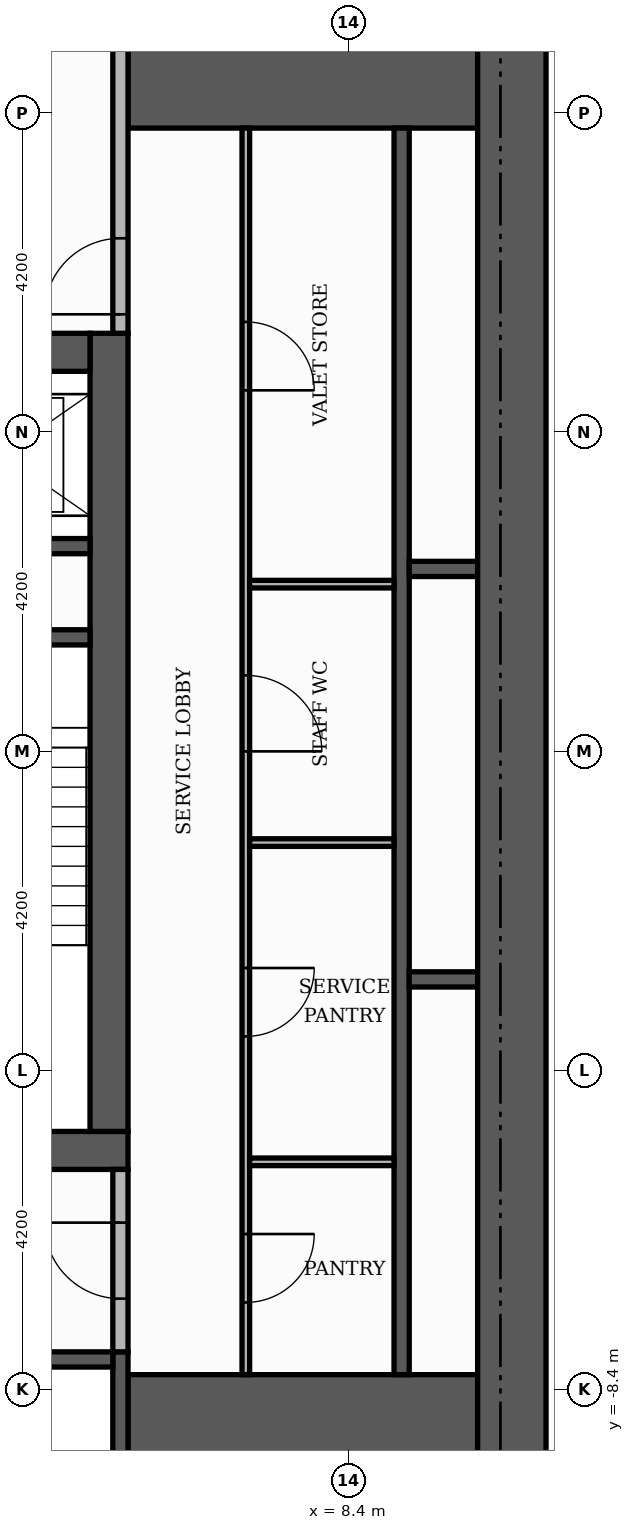
"""IFC4 building model, lengths in metres.
Left out: names, types, materials, properties, quantities, classifications, styles, units other than length and angle.
Written with IfcOpenShell. Run it as: python <this file> out.ifc"""

import sys

from ifc_helpers import new_model, si_unit, direction, frame, frame_2d, origin, place, context, subcontext, project, spatial, rectangle, extrude, element, fill, save


model = new_model("IFC4")
c1 = context("Model", 3, precision=1e-05, world=origin(), true_north=direction((0.0, 1.0)))
c2 = subcontext(c1, "Body", "Model", "MODEL_VIEW")
j1 = project(units=[si_unit("LENGTHUNIT", "METRE"), si_unit("PLANEANGLEUNIT", "RADIAN")], contexts=[c1])
p1 = place(None, origin())
s1 = spatial("IfcSite", under=j1, at=p1, CompositionType="ELEMENT")
p2 = place(p1, origin())
s2 = spatial("IfcBuilding", under=s1, at=p2, CompositionType="ELEMENT")
p3 = place(p2, frame((0.0, 0.0, 94.8)))
s3 = spatial("IfcBuildingStorey", under=s2, at=p3, CompositionType="ELEMENT", Elevation=94.8)
p4 = place(p3, frame((-5.5, -5.25, 0.0), z_axis=(0.0, 0.0, 1.0), x_axis=(1.0, 0.0, 0.0)))
e1 = element("IfcWall", 1, at=p4, inside=s3, PredefinedType="SHEAR", context=c2, shape_type="SweptSolid", body=[
    extrude(rectangle(XDim=11.0, YDim=0.5, at=frame_2d((5.5, 0.0))), origin(), (0.0, 0.0, 1.0), 3.48),
])
p5 = place(p4, frame((4.9, 0.0, 0.0)))
e2 = element("IfcOpeningElement", 2, at=p5, cuts=e1, PredefinedType="OPENING", context=c2, shape_type="SweptSolid", body=[
    extrude(rectangle(XDim=1.2, YDim=2.1, at=frame_2d((0.6, 1.05))), frame((0.0, 0.26, 0.0), z_axis=(0.0, -1.0, 0.0), x_axis=(1.0, 0.0, 0.0)), (0.0, 0.0, 1.0), 0.52),
])
p6 = place(p3, frame((5.25, -5.0, 0.0), z_axis=(0.0, 0.0, 1.0), x_axis=(0.0, 1.0, 0.0)))
e3 = element("IfcWall", 3, at=p6, inside=s3, PredefinedType="SHEAR", context=c2, shape_type="SweptSolid", body=[
    extrude(rectangle(XDim=10.5, YDim=0.5, at=frame_2d((5.25, 0.0))), origin(), (0.0, 0.0, 1.0), 3.48),
])
p7 = place(p3, frame((-5.0, 5.25, 0.0), z_axis=(0.0, 0.0, 1.0), x_axis=(1.0, 0.0, 0.0)))
e4 = element("IfcWall", 4, at=p7, inside=s3, PredefinedType="SHEAR", context=c2, shape_type="SweptSolid", body=[
    extrude(rectangle(XDim=10.0, YDim=0.5, at=frame_2d((5.0, 0.0))), origin(), (0.0, 0.0, 1.0), 3.48),
])
p8 = place(p7, frame((4.4, 0.0, 0.0)))
e5 = element("IfcOpeningElement", 5, at=p8, cuts=e4, PredefinedType="OPENING", context=c2, shape_type="SweptSolid", body=[
    extrude(rectangle(XDim=1.2, YDim=2.1, at=frame_2d((0.6, 1.05))), frame((0.0, 0.26, 0.0), z_axis=(0.0, -1.0, 0.0), x_axis=(1.0, 0.0, 0.0)), (0.0, 0.0, 1.0), 0.52),
])
for number, where, z_axis, x_axis in (
    (6, (5.5, -9.15, 0.0), (0.0, 0.0, 1.0), (1.0, 0.0, 0.0)),
    (7, (5.5, 9.15, 0.0), (0.0, 0.0, 1.0), (1.0, 0.0, 0.0)),
):
    element("IfcWall", number, at=place(p3, frame(where, z_axis=z_axis, x_axis=x_axis)), inside=s3, PredefinedType="SHEAR", context=c2, shape_type="SweptSolid", body=[
        extrude(rectangle(XDim=4.6, YDim=1.9, at=frame_2d((2.3, 0.0))), origin(), (0.0, 0.0, 1.0), 3.48),
    ])
p9 = place(p3, frame((2.15, 1.5, 0.0), z_axis=(0.0, 0.0, 1.0), x_axis=(1.0, 0.0, 0.0)))
e8 = element("IfcWall", 8, at=p9, inside=s3, PredefinedType="SHEAR", context=c2, shape_type="SweptSolid", body=[
    extrude(rectangle(XDim=2.85, YDim=0.2, at=frame_2d((1.425, 0.0))), origin(), (0.0, 0.0, 1.0), 3.48),
])
p10 = place(p3, frame((5.4, -10.1, 0.0), z_axis=(0.0, 0.0, 1.0), x_axis=(0.0, 1.0, 0.0)))
e9 = element("IfcWall", 9, at=p10, inside=s3, PredefinedType="SHEAR", context=c2, shape_type="SweptSolid", body=[
    extrude(rectangle(XDim=2.2, YDim=0.2, at=frame_2d((1.1, 0.0))), origin(), (0.0, 0.0, 1.0), 3.48),
])
p11 = place(p3, frame((9.1, -8.2, 0.0), z_axis=(0.0, 0.0, 1.0), x_axis=(0.0, 1.0, 0.0)))
e10 = element("IfcWall", 10, at=p11, inside=s3, PredefinedType="SHEAR", context=c2, shape_type="SweptSolid", body=[
    extrude(rectangle(XDim=16.4, YDim=0.2, at=frame_2d((8.2, 0.0))), origin(), (0.0, 0.0, 1.0), 3.48),
])
p12 = place(p3, frame((2.8, -8.0, 0.0), z_axis=(0.0, 0.0, 1.0), x_axis=(1.0, 0.0, 0.0)))
e11 = element("IfcWall", 11, at=p12, inside=s3, PredefinedType="SHEAR", context=c2, shape_type="SweptSolid", body=[
    extrude(rectangle(XDim=2.5, YDim=0.2, at=frame_2d((1.25, 0.0))), origin(), (0.0, 0.0, 1.0), 3.48),
])
for number, where, z_axis, x_axis in (
    (12, (9.2, -3.0, 0.0), (0.0, 0.0, 1.0), (1.0, 0.0, 0.0)),
    (13, (9.2, 2.4, 0.0), (0.0, 0.0, 1.0), (1.0, 0.0, 0.0)),
):
    element("IfcWall", number, at=place(p3, frame(where, z_axis=z_axis, x_axis=x_axis)), inside=s3, PredefinedType="SHEAR", context=c2, shape_type="SweptSolid", body=[
        extrude(rectangle(XDim=0.9, YDim=0.2, at=frame_2d((0.45, 0.0))), origin(), (0.0, 0.0, 1.0), 3.48),
    ])
p13 = place(p3, frame((2.15, 2.7, 0.0), z_axis=(0.0, 0.0, 1.0), x_axis=(1.0, 0.0, 0.0)))
e14 = element("IfcWall", 14, at=p13, inside=s3, PredefinedType="SHEAR", context=c2, shape_type="SweptSolid", body=[
    extrude(rectangle(XDim=2.85, YDim=0.2, at=frame_2d((1.425, 0.0))), origin(), (0.0, 0.0, 1.0), 3.48),
])
p14 = place(p3, frame((10.55, -10.1, 0.0), z_axis=(0.0, 0.0, 1.0), x_axis=(0.0, 1.0, 0.0)))
e15 = element("IfcWall", 15, at=p14, inside=s3, PredefinedType="SHEAR", context=c2, shape_type="SweptSolid", body=[
    extrude(rectangle(XDim=20.2, YDim=0.9, at=frame_2d((10.1, 0.0))), origin(), (0.0, 0.0, 1.0), 3.48),
])
p15 = place(p3, frame((7.05, -8.2, 0.0), z_axis=(0.0, 0.0, 1.0), x_axis=(0.0, 1.0, 0.0)))
e16 = element("IfcWall", 16, at=p15, inside=s3, PredefinedType="PARTITIONING", context=c2, shape_type="SweptSolid", body=[
    extrude(rectangle(XDim=16.4, YDim=0.1, at=frame_2d((8.2, 0.0))), origin(), (0.0, 0.0, 1.0), 3.48),
])
p16 = place(p15, frame((0.95, 0.0, 0.0)))
e17 = element("IfcOpeningElement", 17, at=p16, cuts=e16, PredefinedType="OPENING", context=c2, shape_type="SweptSolid", body=[
    extrude(rectangle(XDim=0.9, YDim=2.1, at=frame_2d((0.45, 1.05))), frame((0.0, 0.06, 0.0), z_axis=(0.0, -1.0, 0.0), x_axis=(1.0, 0.0, 0.0)), (0.0, 0.0, 1.0), 0.12),
])
p17 = place(p15, frame((4.45, 0.0, 0.0)))
e18 = element("IfcOpeningElement", 18, at=p17, cuts=e16, PredefinedType="OPENING", context=c2, shape_type="SweptSolid", body=[
    extrude(rectangle(XDim=0.9, YDim=2.1, at=frame_2d((0.45, 1.05))), frame((0.0, 0.06, 0.0), z_axis=(0.0, -1.0, 0.0), x_axis=(1.0, 0.0, 0.0)), (0.0, 0.0, 1.0), 0.12),
])
p18 = place(p15, frame((8.2, 0.0, 0.0)))
e19 = element("IfcOpeningElement", 19, at=p18, cuts=e16, PredefinedType="OPENING", context=c2, shape_type="SweptSolid", body=[
    extrude(rectangle(XDim=1.0, YDim=2.1, at=frame_2d((0.5, 1.05))), frame((0.0, 0.06, 0.0), z_axis=(0.0, -1.0, 0.0), x_axis=(1.0, 0.0, 0.0)), (0.0, 0.0, 1.0), 0.12),
])
p19 = place(p15, frame((12.95, 0.0, 0.0)))
e20 = element("IfcOpeningElement", 20, at=p19, cuts=e16, PredefinedType="OPENING", context=c2, shape_type="SweptSolid", body=[
    extrude(rectangle(XDim=0.9, YDim=2.1, at=frame_2d((0.45, 1.05))), frame((0.0, 0.06, 0.0), z_axis=(0.0, -1.0, 0.0), x_axis=(1.0, 0.0, 0.0)), (0.0, 0.0, 1.0), 0.12),
])
p20 = place(p3, frame((5.4, -7.9, 0.0), z_axis=(0.0, 0.0, 1.0), x_axis=(0.0, 1.0, 0.0)))
e21 = element("IfcWall", 21, at=p20, inside=s3, PredefinedType="PARTITIONING", context=c2, shape_type="SweptSolid", body=[
    extrude(rectangle(XDim=2.4, YDim=0.2, at=frame_2d((1.2, 0.0))), origin(), (0.0, 0.0, 1.0), 3.48),
])
p21 = place(p20, frame((0.7, 0.0, 0.0)))
e22 = element("IfcOpeningElement", 22, at=p21, cuts=e21, PredefinedType="OPENING", context=c2, shape_type="SweptSolid", body=[
    extrude(rectangle(XDim=1.0, YDim=2.1, at=frame_2d((0.5, 1.05))), frame((0.0, 0.11, 0.0), z_axis=(0.0, -1.0, 0.0), x_axis=(1.0, 0.0, 0.0)), (0.0, 0.0, 1.0), 0.22),
])
for number, where, z_axis, x_axis in (
    (23, (7.1, -5.4, 0.0), (0.0, 0.0, 1.0), (1.0, 0.0, 0.0)),
    (24, (7.1, -1.2, 0.0), (0.0, 0.0, 1.0), (1.0, 0.0, 0.0)),
    (25, (7.1, 2.2, 0.0), (0.0, 0.0, 1.0), (1.0, 0.0, 0.0)),
):
    element("IfcWall", number, at=place(p3, frame(where, z_axis=z_axis, x_axis=x_axis)), inside=s3, PredefinedType="PARTITIONING", context=c2, shape_type="SweptSolid", body=[
        extrude(rectangle(XDim=1.9, YDim=0.1, at=frame_2d((0.95, 0.0))), origin(), (0.0, 0.0, 1.0), 3.48),
    ])
p22 = place(p3, frame((5.4, 5.5, 0.0), z_axis=(0.0, 0.0, 1.0), x_axis=(0.0, 1.0, 0.0)))
e26 = element("IfcWall", 26, at=p22, inside=s3, PredefinedType="PARTITIONING", context=c2, shape_type="SweptSolid", body=[
    extrude(rectangle(XDim=4.6, YDim=0.2, at=frame_2d((2.3, 0.0))), origin(), (0.0, 0.0, 1.0), 3.48),
])
p23 = place(p22, frame((0.25, 0.0, 0.0)))
e27 = element("IfcOpeningElement", 27, at=p23, cuts=e26, PredefinedType="OPENING", context=c2, shape_type="SweptSolid", body=[
    extrude(rectangle(XDim=1.0, YDim=2.1, at=frame_2d((0.5, 1.05))), frame((0.0, 0.11, 0.0), z_axis=(0.0, -1.0, 0.0), x_axis=(1.0, 0.0, 0.0)), (0.0, 0.0, 1.0), 0.22),
])
p24 = place(p23, origin())
e28 = element("IfcDoor", 28, at=p24, inside=s3, OperationType="SINGLE_SWING_LEFT", PredefinedType="DOOR", context=c2, shape_type="SweptSolid", body=[
    extrude(rectangle(XDim=1.0, YDim=2.1, at=frame_2d((0.5, 1.05))), frame((0.0, 0.025, 0.0), z_axis=(0.0, -1.0, 0.0), x_axis=(1.0, 0.0, 0.0)), (0.0, 0.0, 1.0), 0.05),
])
fill(e27, e28)
p25 = place(p21, origin())
e29 = element("IfcDoor", 29, at=p25, inside=s3, OperationType="SINGLE_SWING_RIGHT", PredefinedType="DOOR", context=c2, shape_type="SweptSolid", body=[
    extrude(rectangle(XDim=1.0, YDim=2.1, at=frame_2d((0.5, 1.05))), frame((0.0, 0.025, 0.0), z_axis=(0.0, -1.0, 0.0), x_axis=(1.0, 0.0, 0.0)), (0.0, 0.0, 1.0), 0.05),
])
fill(e22, e29)
p26 = place(p16, frame((0.9, 0.0, 0.0), z_axis=(0.0, 0.0, 1.0), x_axis=(-1.0, 0.0, 0.0)))
e30 = element("IfcDoor", 30, at=p26, inside=s3, OperationType="SINGLE_SWING_RIGHT", PredefinedType="DOOR", context=c2, shape_type="SweptSolid", body=[
    extrude(rectangle(XDim=0.9, YDim=2.1, at=frame_2d((0.45, 1.05))), frame((0.0, 0.025, 0.0), z_axis=(0.0, -1.0, 0.0), x_axis=(1.0, 0.0, 0.0)), (0.0, 0.0, 1.0), 0.05),
])
fill(e17, e30)
p27 = place(p17, frame((0.9, 0.0, 0.0), z_axis=(0.0, 0.0, 1.0), x_axis=(-1.0, 0.0, 0.0)))
e31 = element("IfcDoor", 31, at=p27, inside=s3, OperationType="SINGLE_SWING_RIGHT", PredefinedType="DOOR", context=c2, shape_type="SweptSolid", body=[
    extrude(rectangle(XDim=0.9, YDim=2.1, at=frame_2d((0.45, 1.05))), frame((0.0, 0.025, 0.0), z_axis=(0.0, -1.0, 0.0), x_axis=(1.0, 0.0, 0.0)), (0.0, 0.0, 1.0), 0.05),
])
fill(e18, e31)
p28 = place(p18, frame((1.0, 0.0, 0.0), z_axis=(0.0, 0.0, 1.0), x_axis=(-1.0, 0.0, 0.0)))
e32 = element("IfcDoor", 32, at=p28, inside=s3, OperationType="SINGLE_SWING_LEFT", PredefinedType="DOOR", context=c2, shape_type="SweptSolid", body=[
    extrude(rectangle(XDim=1.0, YDim=2.1, at=frame_2d((0.5, 1.05))), frame((0.0, 0.025, 0.0), z_axis=(0.0, -1.0, 0.0), x_axis=(1.0, 0.0, 0.0)), (0.0, 0.0, 1.0), 0.05),
])
fill(e19, e32)
p29 = place(p19, frame((0.9, 0.0, 0.0), z_axis=(0.0, 0.0, 1.0), x_axis=(-1.0, 0.0, 0.0)))
e33 = element("IfcDoor", 33, at=p29, inside=s3, OperationType="SINGLE_SWING_LEFT", PredefinedType="DOOR", context=c2, shape_type="SweptSolid", body=[
    extrude(rectangle(XDim=0.9, YDim=2.1, at=frame_2d((0.45, 1.05))), frame((0.0, 0.025, 0.0), z_axis=(0.0, -1.0, 0.0), x_axis=(1.0, 0.0, 0.0)), (0.0, 0.0, 1.0), 0.05),
])
fill(e20, e33)
save(model, sys.argv[1])
